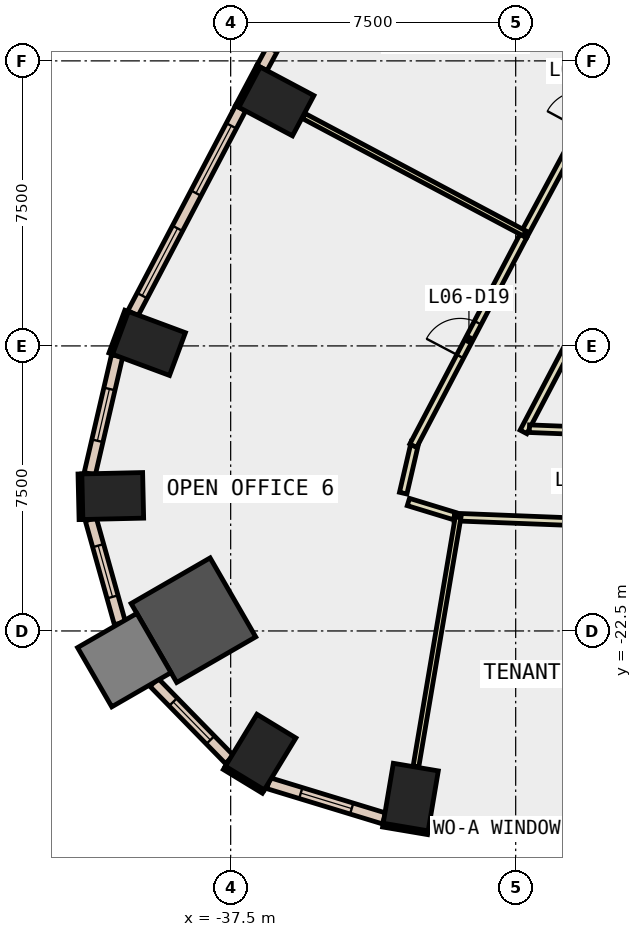
"""IFC4 building model, lengths in metres.
Left out: names, types, materials, properties, quantities, classifications, styles, units other than length and angle.
Written with IfcOpenShell. Run it as: python <this file> out.ifc"""

import sys

from ifc_helpers import new_model, si_unit, direction, frame, frame_2d, origin, origin_2d, place, context, subcontext, project, spatial, rectangle, extrude, element, fill, save


model = new_model("IFC4")
c1 = context("Model", 3, precision=1e-05, world=origin(), true_north=direction((0.0, 1.0)))
c2 = subcontext(c1, "Body", "Model", "MODEL_VIEW")
j1 = project(units=[si_unit("LENGTHUNIT", "METRE"), si_unit("PLANEANGLEUNIT", "RADIAN")], contexts=[c1])
p1 = place(None, origin())
s1 = spatial("IfcSite", under=j1, at=p1, CompositionType="ELEMENT")
p2 = place(p1, origin())
s2 = spatial("IfcBuilding", under=s1, at=p2, CompositionType="ELEMENT")
p3 = place(p2, frame((0.0, 0.0, 35.0)))
s3 = spatial("IfcBuildingStorey", under=s2, at=p3, CompositionType="ELEMENT", Elevation=35.0)
for number, where, z_axis, x_axis in (
    (1, (-32.761, -26.871, -0.6), (0.0, 0.0, 1.0), (-0.986, 0.167, 0.0)),
    (2, (-36.298, -8.567, -0.6), (0.0, 0.0, 1.0), (0.469, 0.883, 0.0)),
    (3, (-39.65, -14.936, -0.6), (0.0, 0.0, 1.0), (0.348, 0.937, 0.0)),
    (4, (-40.603, -18.95, -0.6), (0.0, 0.0, 1.0), (-0.023, 1.0, 0.0)),
):
    element("IfcColumn", number, at=place(p3, frame(where, z_axis=z_axis, x_axis=x_axis)), inside=s3, PredefinedType="COLUMN", context=c2, shape_type="SweptSolid", body=[
        extrude(rectangle(XDim=1.2, YDim=1.6, at=origin_2d()), origin(), (0.0, 0.0, 1.0), 4.4),
    ])
p4 = place(p3, frame((-38.48, -22.217, -0.6), z_axis=(0.0, 0.0, 1.0), x_axis=(0.866025403784, 0.5, 0.0)))
e5 = element("IfcColumn", 5, at=p4, inside=s3, PredefinedType="COLUMN", context=c2, shape_type="SweptSolid", body=[
    extrude(rectangle(XDim=2.4, YDim=2.4, at=origin_2d()), origin(), (0.0, 0.0, 1.0), 4.4),
])
p5 = place(p3, frame((-36.712, -25.688, -0.6), z_axis=(0.0, 0.0, 1.0), x_axis=(-0.854522294989, 0.519414716163, 0.0)))
e6 = element("IfcColumn", 6, at=p5, inside=s3, PredefinedType="COLUMN", context=c2, shape_type="SweptSolid", body=[
    extrude(rectangle(XDim=1.2, YDim=1.6, at=origin_2d()), origin(), (0.0, 0.0, 1.0), 4.4),
])
p6 = place(p3, frame((-40.299, -23.267, -0.6), z_axis=(0.0, 0.0, 1.0), x_axis=(0.866025403784, 0.5, 0.0)))
e7 = element("IfcColumn", 7, at=p6, inside=s3, PredefinedType="COLUMN", context=c2, shape_type="SweptSolid", body=[
    extrude(rectangle(XDim=1.8, YDim=1.8, at=origin_2d()), origin(), (0.0, 0.0, 1.0), 4.4),
])
p7 = place(p3, frame((-36.767, -7.639, 0.0), z_axis=(0.0, 0.0, 1.0), x_axis=(-0.469383408131, -0.882994459876, 0.0)))
e8 = element("IfcWall", 8, at=p7, inside=s3, PredefinedType="STANDARD", context=c2, shape_type="SweptSolid", body=[
    extrude(rectangle(XDim=1.199, YDim=0.1, at=frame_2d((0.6, 0.0))), origin(), (0.0, 0.0, 1.0), 3.8),
])
p8 = place(p3, frame((-40.238, -14.078, 0.0), z_axis=(0.0, 0.0, 1.0), x_axis=(-0.348268249601, -0.937394914814, 0.0)))
e9 = element("IfcWall", 9, at=p8, inside=s3, PredefinedType="STANDARD", context=c2, shape_type="SweptSolid", body=[
    extrude(rectangle(XDim=1.2, YDim=0.1, at=frame_2d((0.6, 0.0))), origin(), (0.0, 0.0, 1.0), 3.8),
])
p9 = place(p3, frame((-33.494, -27.609, 0.0), z_axis=(0.0, 0.0, 1.0), x_axis=(0.98597830993, -0.166873522011, 0.0)))
e10 = element("IfcWall", 10, at=p9, inside=s3, PredefinedType="STANDARD", context=c2, shape_type="SweptSolid", body=[
    extrude(rectangle(XDim=1.2, YDim=0.1, at=frame_2d((0.6, 0.0))), origin(), (0.0, 0.0, 1.0), 3.8),
])
for number, where, z_axis, x_axis in (
    (11, (-41.467, -18.369, 0.0), (0.0, 0.0, 1.0), (0.023, -1.0, 0.0)),
    (12, (-37.666, -26.103, 0.0), (0.0, 0.0, 1.0), (0.855, -0.519, 0.0)),
):
    element("IfcWall", number, at=place(p3, frame(where, z_axis=z_axis, x_axis=x_axis)), inside=s3, PredefinedType="STANDARD", context=c2, shape_type="SweptSolid", body=[
        extrude(rectangle(XDim=1.2, YDim=0.1, at=frame_2d((0.6, 0.0))), origin(), (0.0, 0.0, 1.0), 3.8),
    ])
p10 = place(p3, frame((-32.282, -27.633, 0.0), z_axis=(0.0, 0.0, 1.0), x_axis=(0.999228146648, -0.039282450878, 0.0)))
e13 = element("IfcWall", 13, at=p10, inside=s3, PredefinedType="STANDARD", context=c2, shape_type="SweptSolid", body=[
    extrude(rectangle(XDim=7.154, YDim=0.3, at=frame_2d((3.577, 0.0))), origin(), (0.0, 0.0, 1.0), 3.8),
])
p11 = place(p10, frame((0.588, 0.0, 0.9)))
e14 = element("IfcOpeningElement", 14, at=p11, cuts=e13, PredefinedType="OPENING", context=c2, shape_type="SweptSolid", body=[
    extrude(rectangle(XDim=2.4, YDim=2.6, at=frame_2d((1.2, 1.3))), frame((0.0, 0.16, 0.0), z_axis=(0.0, -1.0, 0.0), x_axis=(1.0, 0.0, 0.0)), (0.0, 0.0, 1.0), 0.32),
])
p12 = place(p10, frame((4.165, 0.0, 0.9)))
e15 = element("IfcOpeningElement", 15, at=p12, cuts=e13, PredefinedType="OPENING", context=c2, shape_type="SweptSolid", body=[
    extrude(rectangle(XDim=2.4, YDim=2.6, at=frame_2d((1.2, 1.3))), frame((0.0, 0.16, 0.0), z_axis=(0.0, -1.0, 0.0), x_axis=(1.0, 0.0, 0.0)), (0.0, 0.0, 1.0), 0.32),
])
p13 = place(p3, frame((-33.779, -2.301, 0.0), z_axis=(0.0, 0.0, 1.0), x_axis=(-0.47375467653, -0.880656860795, 0.0)))
e16 = element("IfcWall", 16, at=p13, inside=s3, PredefinedType="STANDARD", context=c2, shape_type="SweptSolid", body=[
    extrude(rectangle(XDim=6.117, YDim=0.3, at=frame_2d((3.059, 0.0))), origin(), (0.0, 0.0, 1.0), 3.8),
])
p14 = place(p13, frame((0.529, 0.0, 0.9)))
e17 = element("IfcOpeningElement", 17, at=p14, cuts=e16, PredefinedType="OPENING", context=c2, shape_type="SweptSolid", body=[
    extrude(rectangle(XDim=2.0, YDim=2.6, at=frame_2d((1.0, 1.3))), frame((0.0, 0.16, 0.0), z_axis=(0.0, -1.0, 0.0), x_axis=(1.0, 0.0, 0.0)), (0.0, 0.0, 1.0), 0.32),
])
p15 = place(p13, frame((3.588, 0.0, 0.9)))
e18 = element("IfcOpeningElement", 18, at=p15, cuts=e16, PredefinedType="OPENING", context=c2, shape_type="SweptSolid", body=[
    extrude(rectangle(XDim=2.0, YDim=2.6, at=frame_2d((1.0, 1.3))), frame((0.0, 0.16, 0.0), z_axis=(0.0, -1.0, 0.0), x_axis=(1.0, 0.0, 0.0)), (0.0, 0.0, 1.0), 0.32),
])
p16 = place(p3, frame((-37.239, -8.746, 0.0), z_axis=(0.0, 0.0, 1.0), x_axis=(-0.464913987781, -0.885355851602, 0.0)))
e19 = element("IfcWall", 19, at=p16, inside=s3, PredefinedType="STANDARD", context=c2, shape_type="SweptSolid", body=[
    extrude(rectangle(XDim=6.094, YDim=0.3, at=frame_2d((3.047, 0.0))), origin(), (0.0, 0.0, 1.0), 3.8),
])
p17 = place(p16, frame((0.523, 0.0, 0.9)))
e20 = element("IfcOpeningElement", 20, at=p17, cuts=e19, PredefinedType="OPENING", context=c2, shape_type="SweptSolid", body=[
    extrude(rectangle(XDim=2.0, YDim=2.6, at=frame_2d((1.0, 1.3))), frame((0.0, 0.16, 0.0), z_axis=(0.0, -1.0, 0.0), x_axis=(1.0, 0.0, 0.0)), (0.0, 0.0, 1.0), 0.32),
])
p18 = place(p16, frame((3.57, 0.0, 0.9)))
e21 = element("IfcOpeningElement", 21, at=p18, cuts=e19, PredefinedType="OPENING", context=c2, shape_type="SweptSolid", body=[
    extrude(rectangle(XDim=2.0, YDim=2.6, at=frame_2d((1.0, 1.3))), frame((0.0, 0.16, 0.0), z_axis=(0.0, -1.0, 0.0), x_axis=(1.0, 0.0, 0.0)), (0.0, 0.0, 1.0), 0.32),
])
p19 = place(p3, frame((-40.489, -15.264, 0.0), z_axis=(0.0, 0.0, 1.0), x_axis=(-0.225929520451, -0.974143650489, 0.0)))
e22 = element("IfcWall", 22, at=p19, inside=s3, PredefinedType="STANDARD", context=c2, shape_type="SweptSolid", body=[
    extrude(rectangle(XDim=3.182, YDim=0.3, at=frame_2d((1.591, 0.0))), origin(), (0.0, 0.0, 1.0), 3.8),
])
p20 = place(p19, frame((0.891, 0.0, 0.9)))
e23 = element("IfcOpeningElement", 23, at=p20, cuts=e22, PredefinedType="OPENING", context=c2, shape_type="SweptSolid", body=[
    extrude(rectangle(XDim=1.4, YDim=2.6, at=frame_2d((0.7, 1.3))), frame((0.0, 0.16, 0.0), z_axis=(0.0, -1.0, 0.0), x_axis=(1.0, 0.0, 0.0)), (0.0, 0.0, 1.0), 0.32),
])
p21 = place(p3, frame((-41.181, -19.562, 0.0), z_axis=(0.0, 0.0, 1.0), x_axis=(0.269754317033, -0.962929181426, 0.0)))
e24 = element("IfcWall", 24, at=p21, inside=s3, PredefinedType="STANDARD", context=c2, shape_type="SweptSolid", body=[
    extrude(rectangle(XDim=2.839, YDim=0.3, at=frame_2d((1.419, 0.0))), origin(), (0.0, 0.0, 1.0), 3.8),
])
p22 = place(p21, frame((0.72, 0.0, 0.9)))
e25 = element("IfcOpeningElement", 25, at=p22, cuts=e24, PredefinedType="OPENING", context=c2, shape_type="SweptSolid", body=[
    extrude(rectangle(XDim=1.4, YDim=2.6, at=frame_2d((0.7, 1.3))), frame((0.0, 0.16, 0.0), z_axis=(0.0, -1.0, 0.0), x_axis=(1.0, 0.0, 0.0)), (0.0, 0.0, 1.0), 0.32),
])
p23 = place(p3, frame((-39.516, -23.853, 0.0), z_axis=(0.0, 0.0, 1.0), x_axis=(0.699151821451, -0.714973237654, 0.0)))
e26 = element("IfcWall", 26, at=p23, inside=s3, PredefinedType="STANDARD", context=c2, shape_type="SweptSolid", body=[
    extrude(rectangle(XDim=2.839, YDim=0.3, at=frame_2d((1.42, 0.0))), origin(), (0.0, 0.0, 1.0), 3.8),
])
p24 = place(p23, frame((0.72, 0.0, 0.9)))
e27 = element("IfcOpeningElement", 27, at=p24, cuts=e26, PredefinedType="OPENING", context=c2, shape_type="SweptSolid", body=[
    extrude(rectangle(XDim=1.4, YDim=2.6, at=frame_2d((0.7, 1.3))), frame((0.0, 0.16, 0.0), z_axis=(0.0, -1.0, 0.0), x_axis=(1.0, 0.0, 0.0)), (0.0, 0.0, 1.0), 0.32),
])
p25 = place(p3, frame((-36.507, -26.505, 0.0), z_axis=(0.0, 0.0, 1.0), x_axis=(0.95648967224, -0.291766185322, 0.0)))
e28 = element("IfcWall", 28, at=p25, inside=s3, PredefinedType="STANDARD", context=c2, shape_type="SweptSolid", body=[
    extrude(rectangle(XDim=3.181, YDim=0.3, at=frame_2d((1.591, 0.0))), origin(), (0.0, 0.0, 1.0), 3.8),
])
p26 = place(p25, frame((0.891, 0.0, 0.9)))
e29 = element("IfcOpeningElement", 29, at=p26, cuts=e28, PredefinedType="OPENING", context=c2, shape_type="SweptSolid", body=[
    extrude(rectangle(XDim=1.4, YDim=2.6, at=frame_2d((0.7, 1.3))), frame((0.0, 0.16, 0.0), z_axis=(0.0, -1.0, 0.0), x_axis=(1.0, 0.0, 0.0)), (0.0, 0.0, 1.0), 0.32),
])
p27 = place(p3, frame((-27.644, -13.167, 0.0), z_axis=(0.0, 0.0, 1.0), x_axis=(-0.464919738277, -0.885352831904, 0.0)))
e30 = element("IfcWall", 30, at=p27, inside=s3, PredefinedType="PARTITIONING", context=c2, shape_type="SweptSolid", body=[
    extrude(rectangle(XDim=4.626, YDim=0.2, at=frame_2d((2.313, 0.0))), origin(), (0.0, 0.0, 1.0), 3.8),
])
p28 = place(p3, frame((-29.639, -17.178, 0.0), z_axis=(0.0, 0.0, 1.0), x_axis=(0.999228076722, -0.039284229546, 0.0)))
e31 = element("IfcWall", 31, at=p28, inside=s3, PredefinedType="PARTITIONING", context=c2, shape_type="SweptSolid", body=[
    extrude(rectangle(XDim=4.021, YDim=0.2, at=frame_2d((2.01, 0.0))), origin(), (0.0, 0.0, 1.0), 3.8),
])
p29 = place(p3, frame((-29.799, -12.106, 0.0), z_axis=(0.0, 0.0, 1.0), x_axis=(0.473681086062, 0.880696445268, 0.0)))
e32 = element("IfcWall", 32, at=p29, inside=s3, PredefinedType="PARTITIONING", context=c2, shape_type="SweptSolid", body=[
    extrude(rectangle(XDim=7.233, YDim=0.2, at=frame_2d((3.616, 0.0))), origin(), (0.0, 0.0, 1.0), 3.8),
])
p30 = place(p29, frame((3.191, 0.0, 0.0)))
e33 = element("IfcOpeningElement", 33, at=p30, cuts=e32, PredefinedType="OPENING", context=c2, shape_type="SweptSolid", body=[
    extrude(rectangle(XDim=1.0, YDim=2.1, at=frame_2d((0.5, 1.05))), frame((0.0, 0.11, 0.0), z_axis=(0.0, -1.0, 0.0), x_axis=(1.0, 0.0, 0.0)), (0.0, 0.0, 1.0), 0.22),
])
p31 = place(p3, frame((-31.611, -19.477, 0.0), z_axis=(0.0, 0.0, 1.0), x_axis=(-0.956459113118, 0.291866347723, 0.0)))
e34 = element("IfcWall", 34, at=p31, inside=s3, PredefinedType="PARTITIONING", context=c2, shape_type="SweptSolid", body=[
    extrude(rectangle(XDim=1.268, YDim=0.2, at=frame_2d((0.634, 0.0))), origin(), (0.0, 0.0, 1.0), 3.8),
])
p32 = place(p3, frame((-32.96, -18.874, 0.0), z_axis=(0.0, 0.0, 1.0), x_axis=(0.226081445763, 0.974108402531, 0.0)))
e35 = element("IfcWall", 35, at=p32, inside=s3, PredefinedType="PARTITIONING", context=c2, shape_type="SweptSolid", body=[
    extrude(rectangle(XDim=1.371, YDim=0.2, at=frame_2d((0.686, 0.0))), origin(), (0.0, 0.0, 1.0), 3.8),
])
p33 = place(p3, frame((-32.696, -17.626, 0.0), z_axis=(0.0, 0.0, 1.0), x_axis=(0.464767882002, 0.885432558617, 0.0)))
e36 = element("IfcWall", 36, at=p33, inside=s3, PredefinedType="PARTITIONING", context=c2, shape_type="SweptSolid", body=[
    extrude(rectangle(XDim=6.233, YDim=0.2, at=frame_2d((3.117, 0.0))), origin(), (0.0, 0.0, 1.0), 3.8),
])
p34 = place(p33, frame((2.654, 0.0, 0.0)))
e37 = element("IfcOpeningElement", 37, at=p34, cuts=e36, PredefinedType="OPENING", context=c2, shape_type="SweptSolid", body=[
    extrude(rectangle(XDim=1.0, YDim=2.1, at=frame_2d((0.5, 1.05))), frame((0.0, 0.11, 0.0), z_axis=(0.0, -1.0, 0.0), x_axis=(1.0, 0.0, 0.0)), (0.0, 0.0, 1.0), 0.22),
])
p35 = place(p3, frame((-24.186, -19.795, 0.0), z_axis=(0.0, 0.0, 1.0), x_axis=(-0.9992284676, 0.039274285953, 0.0)))
e38 = element("IfcWall", 38, at=p35, inside=s3, PredefinedType="PARTITIONING", context=c2, shape_type="SweptSolid", body=[
    extrude(rectangle(XDim=7.435, YDim=0.2, at=frame_2d((3.717, 0.0))), origin(), (0.0, 0.0, 1.0), 3.8),
])
p36 = place(p35, frame((3.217, 0.0, 0.0)))
e39 = element("IfcOpeningElement", 39, at=p36, cuts=e38, PredefinedType="OPENING", context=c2, shape_type="SweptSolid", body=[
    extrude(rectangle(XDim=1.0, YDim=2.1, at=frame_2d((0.5, 1.05))), frame((0.0, 0.11, 0.0), z_axis=(0.0, -1.0, 0.0), x_axis=(1.0, 0.0, 0.0)), (0.0, 0.0, 1.0), 0.22),
])
p37 = place(p3, frame((-29.764, -12.04, 0.0), z_axis=(0.0, 0.0, 1.0), x_axis=(-0.883018657393, 0.469337885426, 0.0)))
e40 = element("IfcWall", 40, at=p37, inside=s3, PredefinedType="PARTITIONING", context=c2, shape_type="SweptSolid", body=[
    extrude(rectangle(XDim=6.58, YDim=0.15, at=frame_2d((3.29, 0.0))), origin(), (0.0, 0.0, 1.0), 3.8),
])
p38 = place(p3, frame((-31.515, -19.506, 0.0), z_axis=(0.0, 0.0, 1.0), x_axis=(-0.166785823947, -0.985993148521, 0.0)))
e41 = element("IfcWall", 41, at=p38, inside=s3, PredefinedType="PARTITIONING", context=c2, shape_type="SweptSolid", body=[
    extrude(rectangle(XDim=6.65, YDim=0.15, at=frame_2d((3.325, 0.0))), origin(), (0.0, 0.0, 1.0), 3.8),
])
p39 = place(p11, origin())
e42 = element("IfcWindow", 42, at=p39, inside=s3, PartitioningType="SINGLE_PANEL", PredefinedType="WINDOW", context=c2, shape_type="SweptSolid", body=[
    extrude(rectangle(XDim=2.4, YDim=2.6, at=frame_2d((1.2, 1.3))), frame((0.0, 0.03, 0.0), z_axis=(0.0, -1.0, 0.0), x_axis=(1.0, 0.0, 0.0)), (0.0, 0.0, 1.0), 0.06),
])
fill(e14, e42)
p40 = place(p17, origin())
e43 = element("IfcWindow", 43, at=p40, inside=s3, PartitioningType="SINGLE_PANEL", PredefinedType="WINDOW", context=c2, shape_type="SweptSolid", body=[
    extrude(rectangle(XDim=2.0, YDim=2.6, at=frame_2d((1.0, 1.3))), frame((0.0, 0.03, 0.0), z_axis=(0.0, -1.0, 0.0), x_axis=(1.0, 0.0, 0.0)), (0.0, 0.0, 1.0), 0.06),
])
fill(e20, e43)
p41 = place(p18, origin())
e44 = element("IfcWindow", 44, at=p41, inside=s3, PartitioningType="SINGLE_PANEL", PredefinedType="WINDOW", context=c2, shape_type="SweptSolid", body=[
    extrude(rectangle(XDim=2.0, YDim=2.6, at=frame_2d((1.0, 1.3))), frame((0.0, 0.03, 0.0), z_axis=(0.0, -1.0, 0.0), x_axis=(1.0, 0.0, 0.0)), (0.0, 0.0, 1.0), 0.06),
])
fill(e21, e44)
p42 = place(p20, origin())
e45 = element("IfcWindow", 45, at=p42, inside=s3, PartitioningType="SINGLE_PANEL", PredefinedType="WINDOW", context=c2, shape_type="SweptSolid", body=[
    extrude(rectangle(XDim=1.4, YDim=2.6, at=frame_2d((0.7, 1.3))), frame((0.0, 0.03, 0.0), z_axis=(0.0, -1.0, 0.0), x_axis=(1.0, 0.0, 0.0)), (0.0, 0.0, 1.0), 0.06),
])
fill(e23, e45)
p43 = place(p22, origin())
e46 = element("IfcWindow", 46, at=p43, inside=s3, PartitioningType="SINGLE_PANEL", PredefinedType="WINDOW", context=c2, shape_type="SweptSolid", body=[
    extrude(rectangle(XDim=1.4, YDim=2.6, at=frame_2d((0.7, 1.3))), frame((0.0, 0.03, 0.0), z_axis=(0.0, -1.0, 0.0), x_axis=(1.0, 0.0, 0.0)), (0.0, 0.0, 1.0), 0.06),
])
fill(e25, e46)
p44 = place(p24, origin())
e47 = element("IfcWindow", 47, at=p44, inside=s3, PartitioningType="SINGLE_PANEL", PredefinedType="WINDOW", context=c2, shape_type="SweptSolid", body=[
    extrude(rectangle(XDim=1.4, YDim=2.6, at=frame_2d((0.7, 1.3))), frame((0.0, 0.03, 0.0), z_axis=(0.0, -1.0, 0.0), x_axis=(1.0, 0.0, 0.0)), (0.0, 0.0, 1.0), 0.06),
])
fill(e27, e47)
p45 = place(p26, origin())
e48 = element("IfcWindow", 48, at=p45, inside=s3, PartitioningType="SINGLE_PANEL", PredefinedType="WINDOW", context=c2, shape_type="SweptSolid", body=[
    extrude(rectangle(XDim=1.4, YDim=2.6, at=frame_2d((0.7, 1.3))), frame((0.0, 0.03, 0.0), z_axis=(0.0, -1.0, 0.0), x_axis=(1.0, 0.0, 0.0)), (0.0, 0.0, 1.0), 0.06),
])
fill(e29, e48)
p46 = place(p34, origin())
e49 = element("IfcDoor", 49, at=p46, inside=s3, OperationType="SINGLE_SWING_RIGHT", PredefinedType="DOOR", context=c2, shape_type="SweptSolid", body=[
    extrude(rectangle(XDim=1.0, YDim=2.1, at=frame_2d((0.5, 1.05))), frame((0.0, 0.025, 0.0), z_axis=(0.0, -1.0, 0.0), x_axis=(1.0, 0.0, 0.0)), (0.0, 0.0, 1.0), 0.05),
])
fill(e37, e49)
save(model, sys.argv[1])
